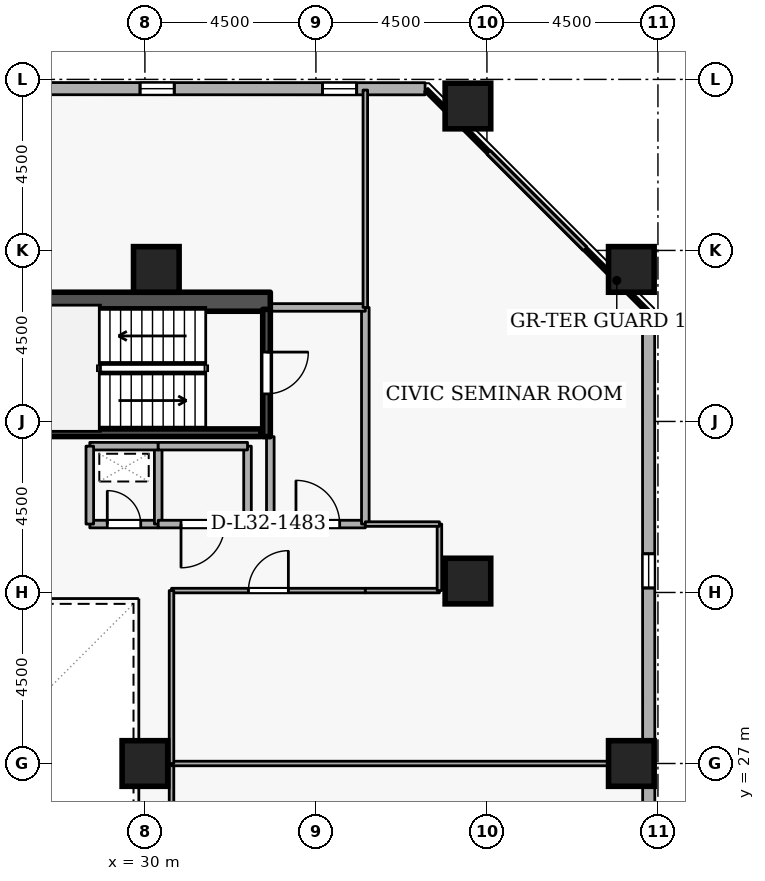
"""IFC4 building model, lengths in metres.
Left out: names, types, materials, properties, quantities, classifications, styles, units other than length and angle.
Written with IfcOpenShell. Run it as: python <this file> out.ifc"""

import sys

from ifc_helpers import new_model, si_unit, direction, frame, frame_2d, origin, origin_2d, place, context, subcontext, project, spatial, rectangle, extrude, element, fill, save


model = new_model("IFC4")
c1 = context("Model", 3, precision=1e-05, world=origin(), true_north=direction((0.0, 1.0)))
c2 = subcontext(c1, "Body", "Model", "MODEL_VIEW")
j1 = project(units=[si_unit("LENGTHUNIT", "METRE"), si_unit("PLANEANGLEUNIT", "RADIAN")], contexts=[c1])
p1 = place(None, origin())
s1 = spatial("IfcSite", under=j1, at=p1, CompositionType="ELEMENT")
p2 = place(p1, origin())
s2 = spatial("IfcBuilding", under=s1, at=p2, CompositionType="ELEMENT")
p3 = place(p2, frame((0.0, 0.0, 123.3)))
s3 = spatial("IfcBuildingStorey", under=s2, at=p3, CompositionType="ELEMENT", Elevation=123.3)
p4 = place(p3, frame((17.7, 39.15, 0.0), z_axis=(0.0, 0.0, 1.0), x_axis=(1.0, 0.0, 0.0)))
e1 = element("IfcWall", 1, at=p4, inside=s3, PredefinedType="SHEAR", context=c2, shape_type="SweptSolid", body=[
    extrude(rectangle(XDim=15.6, YDim=0.5, at=frame_2d((7.8, 0.0))), origin(), (0.0, 0.0, 1.0), 3.6),
])
for number, where, z_axis, x_axis in (
    (2, (42.8, 27.0, 0.0), (0.0, 0.0, 1.0), (1.0, 0.0, 0.0)),
    (3, (42.8, 40.0, 0.0), (0.0, 0.0, 1.0), (1.0, 0.0, 0.0)),
    (4, (38.5, 44.3, 0.0), (0.0, 0.0, 1.0), (1.0, 0.0, 0.0)),
    (5, (38.5, 31.8, 0.0), (0.0, 0.0, 1.0), (1.0, 0.0, 0.0)),
    (6, (30.3, 40.0, 0.0), (0.0, 0.0, 1.0), (1.0, 0.0, 0.0)),
    (7, (30.0, 27.0, 0.0), (0.0, 0.0, 1.0), (1.0, 0.0, 0.0)),
):
    element("IfcColumn", number, at=place(p3, frame(where, z_axis=z_axis, x_axis=x_axis)), inside=s3, PredefinedType="COLUMN", context=c2, shape_type="SweptSolid", body=[
        extrude(rectangle(XDim=1.2, YDim=1.2, at=origin_2d()), origin(), (0.0, 0.0, 1.0), 3.6),
    ])
p5 = place(p3, frame((43.265, 5.819, 0.0), z_axis=(0.0, 0.0, 1.0), x_axis=(-0.000332378036, 0.999999944762, 0.0)))
e8 = element("IfcWall", 8, at=p5, inside=s3, PredefinedType="STANDARD", context=c2, shape_type="SweptSolid", body=[
    extrude(rectangle(XDim=33.054, YDim=0.32, at=frame_2d((16.527, 0.0))), origin(), (0.0, 0.0, 1.0), 2.7),
])
p6 = place(p5, frame((1.8, 0.0, 0.72)))
e9 = element("IfcOpeningElement", 9, at=p6, cuts=e8, PredefinedType="OPENING", context=c2, shape_type="SweptSolid", body=[
    extrude(rectangle(XDim=0.9, YDim=1.75, at=frame_2d((0.45, 0.875))), frame((0.0, 0.17, 0.0), z_axis=(0.0, -1.0, 0.0), x_axis=(1.0, 0.0, 0.0)), (0.0, 0.0, 1.0), 0.34),
])
p7 = place(p5, frame((11.4, 0.0, 0.72)))
e10 = element("IfcOpeningElement", 10, at=p7, cuts=e8, PredefinedType="OPENING", context=c2, shape_type="SweptSolid", body=[
    extrude(rectangle(XDim=0.9, YDim=1.75, at=frame_2d((0.45, 0.875))), frame((0.0, 0.17, 0.0), z_axis=(0.0, -1.0, 0.0), x_axis=(1.0, 0.0, 0.0)), (0.0, 0.0, 1.0), 0.34),
])
p8 = place(p5, frame((16.2, 0.0, 0.72)))
e11 = element("IfcOpeningElement", 11, at=p8, cuts=e8, PredefinedType="OPENING", context=c2, shape_type="SweptSolid", body=[
    extrude(rectangle(XDim=0.9, YDim=1.75, at=frame_2d((0.45, 0.875))), frame((0.0, 0.17, 0.0), z_axis=(0.0, -1.0, 0.0), x_axis=(1.0, 0.0, 0.0)), (0.0, 0.0, 1.0), 0.34),
])
p9 = place(p5, frame((25.8, 0.0, 0.72)))
e12 = element("IfcOpeningElement", 12, at=p9, cuts=e8, PredefinedType="OPENING", context=c2, shape_type="SweptSolid", body=[
    extrude(rectangle(XDim=0.9, YDim=1.75, at=frame_2d((0.45, 0.875))), frame((0.0, 0.17, 0.0), z_axis=(0.0, -1.0, 0.0), x_axis=(1.0, 0.0, 0.0)), (0.0, 0.0, 1.0), 0.34),
])
p10 = place(p3, frame((37.372, 44.754, 0.0), z_axis=(0.0, 0.0, 1.0), x_axis=(-0.999999944762, 0.000332378036, 0.0)))
e13 = element("IfcWall", 13, at=p10, inside=s3, PredefinedType="STANDARD", context=c2, shape_type="SweptSolid", body=[
    extrude(rectangle(XDim=33.054, YDim=0.32, at=frame_2d((16.527, 0.0))), origin(), (0.0, 0.0, 1.0), 2.7),
])
p11 = place(p10, frame((1.8, 0.0, 0.72)))
e14 = element("IfcOpeningElement", 14, at=p11, cuts=e13, PredefinedType="OPENING", context=c2, shape_type="SweptSolid", body=[
    extrude(rectangle(XDim=0.9, YDim=1.75, at=frame_2d((0.45, 0.875))), frame((0.0, 0.17, 0.0), z_axis=(0.0, -1.0, 0.0), x_axis=(1.0, 0.0, 0.0)), (0.0, 0.0, 1.0), 0.34),
])
p12 = place(p10, frame((6.6, 0.0, 0.72)))
e15 = element("IfcOpeningElement", 15, at=p12, cuts=e13, PredefinedType="OPENING", context=c2, shape_type="SweptSolid", body=[
    extrude(rectangle(XDim=0.9, YDim=1.75, at=frame_2d((0.45, 0.875))), frame((0.0, 0.17, 0.0), z_axis=(0.0, -1.0, 0.0), x_axis=(1.0, 0.0, 0.0)), (0.0, 0.0, 1.0), 0.34),
])
p13 = place(p10, frame((16.2, 0.0, 0.72)))
e16 = element("IfcOpeningElement", 16, at=p13, cuts=e13, PredefinedType="OPENING", context=c2, shape_type="SweptSolid", body=[
    extrude(rectangle(XDim=0.9, YDim=1.75, at=frame_2d((0.45, 0.875))), frame((0.0, 0.17, 0.0), z_axis=(0.0, -1.0, 0.0), x_axis=(1.0, 0.0, 0.0)), (0.0, 0.0, 1.0), 0.34),
])
p14 = place(p10, frame((21.0, 0.0, 0.72)))
e17 = element("IfcOpeningElement", 17, at=p14, cuts=e13, PredefinedType="OPENING", context=c2, shape_type="SweptSolid", body=[
    extrude(rectangle(XDim=0.9, YDim=1.75, at=frame_2d((0.45, 0.875))), frame((0.0, 0.17, 0.0), z_axis=(0.0, -1.0, 0.0), x_axis=(1.0, 0.0, 0.0)), (0.0, 0.0, 1.0), 0.34),
])
p15 = place(p3, frame((33.2, 38.95, 0.0), z_axis=(0.0, 0.0, 1.0), x_axis=(0.0, -1.0, 0.0)))
e18 = element("IfcWall", 18, at=p15, inside=s3, PredefinedType="SHEAR", context=c2, shape_type="SweptSolid", body=[
    extrude(rectangle(XDim=3.35, YDim=0.2, at=frame_2d((1.675, 0.0))), origin(), (0.0, 0.0, 1.0), 3.6),
])
p16 = place(p15, frame((1.125, 0.0, 0.0)))
e19 = element("IfcOpeningElement", 19, at=p16, cuts=e18, PredefinedType="OPENING", context=c2, shape_type="SweptSolid", body=[
    extrude(rectangle(XDim=1.1, YDim=2.1, at=frame_2d((0.55, 1.05))), frame((0.0, 0.11, 0.0), z_axis=(0.0, -1.0, 0.0), x_axis=(1.0, 0.0, 0.0)), (0.0, 0.0, 1.0), 0.22),
])
p17 = place(p3, frame((25.95, 35.703, 0.0), z_axis=(0.0, 0.0, 1.0), x_axis=(1.0, 0.0, 0.0)))
e20 = element("IfcWall", 20, at=p17, inside=s3, PredefinedType="SHEAR", context=c2, shape_type="SweptSolid", body=[
    extrude(rectangle(XDim=7.1, YDim=0.2, at=frame_2d((3.55, 0.0))), origin(), (0.0, 0.0, 1.0), 3.6),
])
p18 = place(p3, frame((33.3, 33.3, 0.0), z_axis=(0.0, 0.0, 1.0), x_axis=(1.0, 0.0, 0.0)))
e21 = element("IfcWall", 21, at=p18, inside=s3, PredefinedType="STANDARD", context=c2, shape_type="SweptSolid", body=[
    extrude(rectangle(XDim=2.5, YDim=0.2, at=frame_2d((1.25, 0.0))), origin(), (0.0, 0.0, 1.0), 3.34),
])
p19 = place(p18, frame((0.675, 0.0, 0.0)))
e22 = element("IfcOpeningElement", 22, at=p19, cuts=e21, PredefinedType="OPENING", context=c2, shape_type="SweptSolid", body=[
    extrude(rectangle(XDim=1.15, YDim=2.1, at=frame_2d((0.575, 1.05))), frame((0.0, 0.11, 0.0), z_axis=(0.0, -1.0, 0.0), x_axis=(1.0, 0.0, 0.0)), (0.0, 0.0, 1.0), 0.22),
])
p20 = place(p3, frame((35.8, 33.3, 0.0), z_axis=(0.0, 0.0, 1.0), x_axis=(0.0, 1.0, 0.0)))
e23 = element("IfcWall", 23, at=p20, inside=s3, PredefinedType="STANDARD", context=c2, shape_type="SweptSolid", body=[
    extrude(rectangle(XDim=5.7, YDim=0.2, at=frame_2d((2.85, 0.0))), origin(), (0.0, 0.0, 1.0), 3.34),
])
p21 = place(p3, frame((35.8, 39.0, 0.0), z_axis=(0.0, 0.0, 1.0), x_axis=(-1.0, 0.0, 0.0)))
e24 = element("IfcWall", 24, at=p21, inside=s3, PredefinedType="STANDARD", context=c2, shape_type="SweptSolid", body=[
    extrude(rectangle(XDim=2.5, YDim=0.2, at=frame_2d((1.25, 0.0))), origin(), (0.0, 0.0, 1.0), 3.34),
])
p22 = place(p3, frame((33.3, 35.6, 0.0), z_axis=(0.0, 0.0, 1.0), x_axis=(0.0, -1.0, 0.0)))
e25 = element("IfcWall", 25, at=p22, inside=s3, PredefinedType="STANDARD", context=c2, shape_type="SweptSolid", body=[
    extrude(rectangle(XDim=2.3, YDim=0.2, at=frame_2d((1.15, 0.0))), origin(), (0.0, 0.0, 1.0), 2.545),
])
p23 = place(p3, frame((28.55, 33.3, 0.0), z_axis=(0.0, 0.0, 1.0), x_axis=(1.0, 0.0, 0.0)))
e26 = element("IfcWall", 26, at=p23, inside=s3, PredefinedType="STANDARD", context=c2, shape_type="SweptSolid", body=[
    extrude(rectangle(XDim=1.8, YDim=0.2, at=frame_2d((0.9, 0.0))), origin(), (0.0, 0.0, 1.0), 3.34),
])
p24 = place(p23, frame((0.46, 0.0, 0.0)))
e27 = element("IfcOpeningElement", 27, at=p24, cuts=e26, PredefinedType="OPENING", context=c2, shape_type="SweptSolid", body=[
    extrude(rectangle(XDim=0.88, YDim=2.04, at=frame_2d((0.44, 1.02))), frame((0.0, 0.11, 0.0), z_axis=(0.0, -1.0, 0.0), x_axis=(1.0, 0.0, 0.0)), (0.0, 0.0, 1.0), 0.22),
])
p25 = place(p3, frame((30.35, 33.3, 0.0), z_axis=(0.0, 0.0, 1.0), x_axis=(0.0, 1.0, 0.0)))
e28 = element("IfcWall", 28, at=p25, inside=s3, PredefinedType="STANDARD", context=c2, shape_type="SweptSolid", body=[
    extrude(rectangle(XDim=2.05, YDim=0.2, at=frame_2d((1.025, 0.0))), origin(), (0.0, 0.0, 1.0), 3.34),
])
p26 = place(p3, frame((30.35, 35.35, 0.0), z_axis=(0.0, 0.0, 1.0), x_axis=(-1.0, 0.0, 0.0)))
e29 = element("IfcWall", 29, at=p26, inside=s3, PredefinedType="STANDARD", context=c2, shape_type="SweptSolid", body=[
    extrude(rectangle(XDim=1.8, YDim=0.2, at=frame_2d((0.9, 0.0))), origin(), (0.0, 0.0, 1.0), 3.34),
])
p27 = place(p3, frame((28.55, 35.35, 0.0), z_axis=(0.0, 0.0, 1.0), x_axis=(0.0, -1.0, 0.0)))
e30 = element("IfcWall", 30, at=p27, inside=s3, PredefinedType="STANDARD", context=c2, shape_type="SweptSolid", body=[
    extrude(rectangle(XDim=2.05, YDim=0.2, at=frame_2d((1.025, 0.0))), origin(), (0.0, 0.0, 1.0), 3.34),
])
p28 = place(p3, frame((32.7, 35.35, 0.0), z_axis=(0.0, 0.0, 1.0), x_axis=(0.0, -1.0, 0.0)))
e31 = element("IfcWall", 31, at=p28, inside=s3, PredefinedType="STANDARD", context=c2, shape_type="SweptSolid", body=[
    extrude(rectangle(XDim=2.05, YDim=0.2, at=frame_2d((1.025, 0.0))), origin(), (0.0, 0.0, 1.0), 2.545),
])
p29 = place(p3, frame((32.7, 33.3, 0.0), z_axis=(0.0, 0.0, 1.0), x_axis=(-1.0, 0.0, 0.0)))
e32 = element("IfcWall", 32, at=p29, inside=s3, PredefinedType="STANDARD", context=c2, shape_type="SweptSolid", body=[
    extrude(rectangle(XDim=2.35, YDim=0.2, at=frame_2d((1.175, 0.0))), origin(), (0.0, 0.0, 1.0), 3.34),
])
p30 = place(p29, frame((0.6, 0.0, 0.0)))
e33 = element("IfcOpeningElement", 33, at=p30, cuts=e32, PredefinedType="OPENING", context=c2, shape_type="SweptSolid", body=[
    extrude(rectangle(XDim=1.15, YDim=2.1, at=frame_2d((0.575, 1.05))), frame((0.0, 0.11, 0.0), z_axis=(0.0, -1.0, 0.0), x_axis=(1.0, 0.0, 0.0)), (0.0, 0.0, 1.0), 0.22),
])
p31 = place(p3, frame((30.35, 35.35, 0.0), z_axis=(0.0, 0.0, 1.0), x_axis=(1.0, 0.0, 0.0)))
e34 = element("IfcWall", 34, at=p31, inside=s3, PredefinedType="STANDARD", context=c2, shape_type="SweptSolid", body=[
    extrude(rectangle(XDim=2.35, YDim=0.2, at=frame_2d((1.175, 0.0))), origin(), (0.0, 0.0, 1.0), 3.34),
])
p32 = place(p3, frame((30.7, 22.45, 0.0), z_axis=(0.0, 0.0, 1.0), x_axis=(0.0, 1.0, 0.0)))
e35 = element("IfcWall", 35, at=p32, inside=s3, PredefinedType="PARTITIONING", context=c2, shape_type="SweptSolid", body=[
    extrude(rectangle(XDim=4.55, YDim=0.12, at=frame_2d((2.275, 0.0))), origin(), (0.0, 0.0, 1.0), 3.34),
])
p33 = place(p3, frame((30.7, 27.0, 0.0), z_axis=(0.0, 0.0, 1.0), x_axis=(1.0, 0.0, 0.0)))
e36 = element("IfcWall", 36, at=p33, inside=s3, PredefinedType="PARTITIONING", context=c2, shape_type="SweptSolid", body=[
    extrude(rectangle(XDim=12.52, YDim=0.12, at=frame_2d((6.26, 0.0))), origin(), (0.0, 0.0, 1.0), 2.932),
])
p34 = place(p3, frame((30.7, 31.55, 0.0), z_axis=(0.0, 0.0, 1.0), x_axis=(1.0, 0.0, 0.0)))
e37 = element("IfcWall", 37, at=p34, inside=s3, PredefinedType="PARTITIONING", context=c2, shape_type="SweptSolid", body=[
    extrude(rectangle(XDim=5.1, YDim=0.12, at=frame_2d((2.55, 0.0))), origin(), (0.0, 0.0, 1.0), 3.34),
])
p35 = place(p34, frame((2.025, 0.0, 0.0)))
e38 = element("IfcOpeningElement", 38, at=p35, cuts=e37, PredefinedType="OPENING", context=c2, shape_type="SweptSolid", body=[
    extrude(rectangle(XDim=1.05, YDim=2.1, at=frame_2d((0.525, 1.05))), frame((0.0, 0.07, 0.0), z_axis=(0.0, -1.0, 0.0), x_axis=(1.0, 0.0, 0.0)), (0.0, 0.0, 1.0), 0.14),
])
p36 = place(p3, frame((35.8, 31.55, 0.0), z_axis=(0.0, 0.0, 1.0), x_axis=(1.0, 0.0, 0.0)))
e39 = element("IfcWall", 39, at=p36, inside=s3, PredefinedType="PARTITIONING", context=c2, shape_type="SweptSolid", body=[
    extrude(rectangle(XDim=1.95, YDim=0.12, at=frame_2d((0.975, 0.0))), origin(), (0.0, 0.0, 1.0), 3.34),
])
p37 = place(p3, frame((37.75, 31.55, 0.0), z_axis=(0.0, 0.0, 1.0), x_axis=(0.0, 1.0, 0.0)))
e40 = element("IfcWall", 40, at=p37, inside=s3, PredefinedType="PARTITIONING", context=c2, shape_type="SweptSolid", body=[
    extrude(rectangle(XDim=1.75, YDim=0.12, at=frame_2d((0.875, 0.0))), origin(), (0.0, 0.0, 1.0), 3.34),
])
p38 = place(p3, frame((37.75, 33.3, 0.0), z_axis=(0.0, 0.0, 1.0), x_axis=(-1.0, 0.0, 0.0)))
e41 = element("IfcWall", 41, at=p38, inside=s3, PredefinedType="PARTITIONING", context=c2, shape_type="SweptSolid", body=[
    extrude(rectangle(XDim=1.95, YDim=0.12, at=frame_2d((0.975, 0.0))), origin(), (0.0, 0.0, 1.0), 3.34),
])
p39 = place(p3, frame((35.8, 39.0, 0.0), z_axis=(0.0, 0.0, 1.0), x_axis=(0.0, 1.0, 0.0)))
e42 = element("IfcWall", 42, at=p39, inside=s3, PredefinedType="PARTITIONING", context=c2, shape_type="SweptSolid", body=[
    extrude(rectangle(XDim=5.72, YDim=0.12, at=frame_2d((2.86, 0.0))), origin(), (0.0, 0.0, 1.0), 3.34),
])
p40 = place(p3, frame((37.402, 44.72, 0.0), z_axis=(0.0, 0.0, 1.0), x_axis=(0.707106781187, -0.707106781187, 0.0)))
e43 = element("IfcWall", 43, at=p40, inside=s3, PredefinedType="PARTITIONING", context=c2, shape_type="SweptSolid", body=[
    extrude(rectangle(XDim=8.227, YDim=0.12, at=frame_2d((4.114, 0.0))), origin(), (0.0, 0.0, 1.0), 3.34),
])
p41 = place(p3, frame((30.7, 27.0, 0.0), z_axis=(0.0, 0.0, 1.0), x_axis=(0.0, 1.0, 0.0)))
e44 = element("IfcWall", 44, at=p41, inside=s3, PredefinedType="PARTITIONING", context=c2, shape_type="SweptSolid", body=[
    extrude(rectangle(XDim=4.55, YDim=0.12, at=frame_2d((2.275, 0.0))), origin(), (0.0, 0.0, 1.0), 3.34),
])
p42 = place(p9, origin())
e45 = element("IfcWindow", 45, at=p42, inside=s3, PartitioningType="SINGLE_PANEL", PredefinedType="WINDOW", context=c2, shape_type="SweptSolid", body=[
    extrude(rectangle(XDim=0.9, YDim=1.75, at=frame_2d((0.45, 0.875))), frame((0.0, 0.03, 0.0), z_axis=(0.0, -1.0, 0.0), x_axis=(1.0, 0.0, 0.0)), (0.0, 0.0, 1.0), 0.06),
])
fill(e12, e45)
p43 = place(p11, origin())
e46 = element("IfcWindow", 46, at=p43, inside=s3, PartitioningType="SINGLE_PANEL", PredefinedType="WINDOW", context=c2, shape_type="SweptSolid", body=[
    extrude(rectangle(XDim=0.9, YDim=1.75, at=frame_2d((0.45, 0.875))), frame((0.0, 0.03, 0.0), z_axis=(0.0, -1.0, 0.0), x_axis=(1.0, 0.0, 0.0)), (0.0, 0.0, 1.0), 0.06),
])
fill(e14, e46)
p44 = place(p12, origin())
e47 = element("IfcWindow", 47, at=p44, inside=s3, PartitioningType="SINGLE_PANEL", PredefinedType="WINDOW", context=c2, shape_type="SweptSolid", body=[
    extrude(rectangle(XDim=0.9, YDim=1.75, at=frame_2d((0.45, 0.875))), frame((0.0, 0.03, 0.0), z_axis=(0.0, -1.0, 0.0), x_axis=(1.0, 0.0, 0.0)), (0.0, 0.0, 1.0), 0.06),
])
fill(e15, e47)
p45 = place(p16, origin())
e48 = element("IfcDoor", 48, at=p45, inside=s3, OperationType="SINGLE_SWING_LEFT", PredefinedType="DOOR", context=c2, shape_type="SweptSolid", body=[
    extrude(rectangle(XDim=1.1, YDim=2.1, at=frame_2d((0.55, 1.05))), frame((0.0, 0.025, 0.0), z_axis=(0.0, -1.0, 0.0), x_axis=(1.0, 0.0, 0.0)), (0.0, 0.0, 1.0), 0.05),
])
fill(e19, e48)
p46 = place(p19, origin())
e49 = element("IfcDoor", 49, at=p46, inside=s3, OperationType="SINGLE_SWING_LEFT", PredefinedType="DOOR", context=c2, shape_type="SweptSolid", body=[
    extrude(rectangle(XDim=1.15, YDim=2.1, at=frame_2d((0.575, 1.05))), frame((0.0, 0.025, 0.0), z_axis=(0.0, -1.0, 0.0), x_axis=(1.0, 0.0, 0.0)), (0.0, 0.0, 1.0), 0.05),
])
fill(e22, e49)
p47 = place(p24, origin())
e50 = element("IfcDoor", 50, at=p47, inside=s3, OperationType="SINGLE_SWING_LEFT", PredefinedType="DOOR", context=c2, shape_type="SweptSolid", body=[
    extrude(rectangle(XDim=0.88, YDim=2.04, at=frame_2d((0.44, 1.02))), frame((0.0, 0.025, 0.0), z_axis=(0.0, -1.0, 0.0), x_axis=(1.0, 0.0, 0.0)), (0.0, 0.0, 1.0), 0.05),
])
fill(e27, e50)
p48 = place(p30, origin())
e51 = element("IfcDoor", 51, at=p48, inside=s3, OperationType="SINGLE_SWING_RIGHT", PredefinedType="DOOR", context=c2, shape_type="SweptSolid", body=[
    extrude(rectangle(XDim=1.15, YDim=2.1, at=frame_2d((0.575, 1.05))), frame((0.0, 0.025, 0.0), z_axis=(0.0, -1.0, 0.0), x_axis=(1.0, 0.0, 0.0)), (0.0, 0.0, 1.0), 0.05),
])
fill(e33, e51)
p49 = place(p35, origin())
e52 = element("IfcDoor", 52, at=p49, inside=s3, OperationType="SINGLE_SWING_RIGHT", PredefinedType="DOOR", context=c2, shape_type="SweptSolid", body=[
    extrude(rectangle(XDim=1.05, YDim=2.1, at=frame_2d((0.525, 1.05))), frame((0.0, 0.025, 0.0), z_axis=(0.0, -1.0, 0.0), x_axis=(1.0, 0.0, 0.0)), (0.0, 0.0, 1.0), 0.05),
])
fill(e38, e52)
save(model, sys.argv[1])
